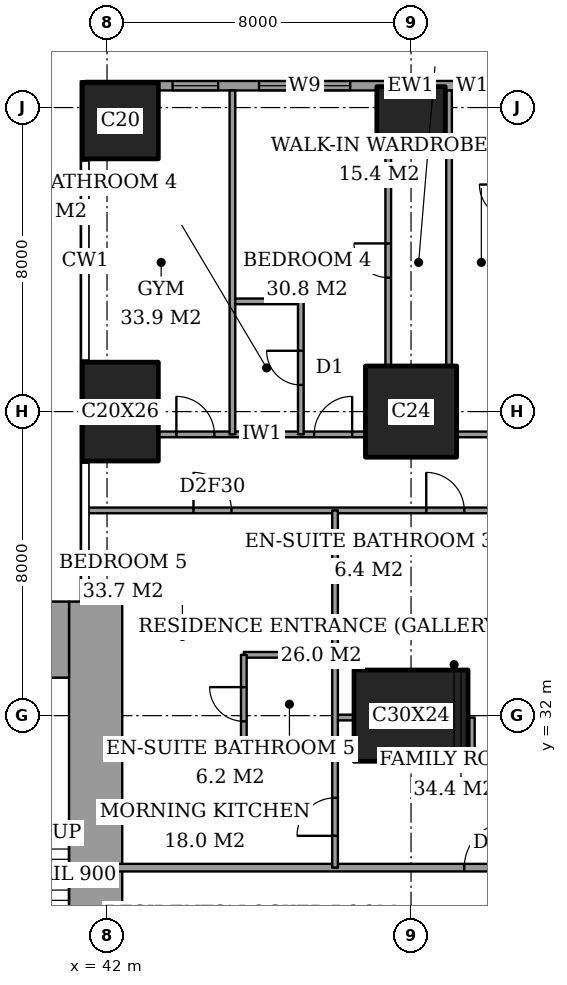
"""IFC4 building model, lengths in metres.
Left out: names, types, materials, properties, quantities, classifications, styles, units other than length and angle.
Written with IfcOpenShell. Run it as: python <this file> out.ifc"""

import sys

from ifc_helpers import new_model, si_unit, direction, frame, frame_2d, origin, origin_2d, place, context, subcontext, project, spatial, rectangle, extrude, element, fill, save


model = new_model("IFC4")
c1 = context("Model", 3, precision=1e-05, world=origin(), true_north=direction((0.0, 1.0)))
c2 = subcontext(c1, "Body", "Model", "MODEL_VIEW")
j1 = project(units=[si_unit("LENGTHUNIT", "METRE"), si_unit("PLANEANGLEUNIT", "RADIAN")], contexts=[c1])
p1 = place(None, origin())
s1 = spatial("IfcSite", under=j1, at=p1, CompositionType="ELEMENT")
p2 = place(p1, origin())
s2 = spatial("IfcBuilding", under=s1, at=p2, CompositionType="ELEMENT")
p3 = place(p2, frame((0.0, 0.0, 196.6)))
s3 = spatial("IfcBuildingStorey", under=s2, at=p3, CompositionType="ELEMENT", Elevation=196.6)
p4 = place(p3, frame((42.35, 40.0, 0.0), z_axis=(0.0, 0.0, 1.0), x_axis=(1.0, 0.0, 0.0)))
e1 = element("IfcColumn", 1, at=p4, inside=s3, PredefinedType="COLUMN", context=c2, shape_type="SweptSolid", body=[
    extrude(rectangle(XDim=2.0, YDim=2.6, at=origin_2d()), origin(), (0.0, 0.0, 1.0), 3.6),
])
p5 = place(p3, frame((42.35, 47.65, 0.0), z_axis=(0.0, 0.0, 1.0), x_axis=(1.0, 0.0, 0.0)))
e2 = element("IfcColumn", 2, at=p5, inside=s3, PredefinedType="COLUMN", context=c2, shape_type="SweptSolid", body=[
    extrude(rectangle(XDim=2.0, YDim=2.0, at=origin_2d()), origin(), (0.0, 0.0, 1.0), 3.6),
])
p6 = place(p3, frame((50.0, 32.0, 0.0), z_axis=(0.0, 0.0, 1.0), x_axis=(1.0, 0.0, 0.0)))
e3 = element("IfcColumn", 3, at=p6, inside=s3, PredefinedType="COLUMN", context=c2, shape_type="SweptSolid", body=[
    extrude(rectangle(XDim=3.0, YDim=2.4, at=origin_2d()), origin(), (0.0, 0.0, 1.0), 3.6),
])
p7 = place(p3, frame((50.0, 40.0, 0.0), z_axis=(0.0, 0.0, 1.0), x_axis=(1.0, 0.0, 0.0)))
e4 = element("IfcColumn", 4, at=p7, inside=s3, PredefinedType="COLUMN", context=c2, shape_type="SweptSolid", body=[
    extrude(rectangle(XDim=2.4, YDim=2.4, at=origin_2d()), origin(), (0.0, 0.0, 1.0), 3.6),
])
p8 = place(p3, frame((50.0, 47.65, 0.0), z_axis=(0.0, 0.0, 1.0), x_axis=(1.0, 0.0, 0.0)))
e5 = element("IfcColumn", 5, at=p8, inside=s3, PredefinedType="COLUMN", context=c2, shape_type="SweptSolid", body=[
    extrude(rectangle(XDim=1.8, YDim=1.8, at=origin_2d()), origin(), (0.0, 0.0, 1.0), 3.6),
])
p9 = place(p3, frame((37.85, 34.0, 0.0), z_axis=(0.0, 0.0, 1.0), x_axis=(1.0, 0.0, 0.0)))
e6 = element("IfcWall", 6, at=p9, inside=s3, PredefinedType="SHEAR", context=c2, shape_type="SweptSolid", body=[
    extrude(rectangle(XDim=3.15, YDim=2.0, at=frame_2d((1.575, 0.0))), origin(), (0.0, 0.0, 1.0), 3.6),
])
p10 = place(p3, frame((41.7, 24.85, 0.0), z_axis=(0.0, 0.0, 1.0), x_axis=(0.0, 1.0, 0.0)))
e7 = element("IfcWall", 7, at=p10, inside=s3, PredefinedType="SHEAR", context=c2, shape_type="SweptSolid", body=[
    extrude(rectangle(XDim=10.15, YDim=1.4, at=frame_2d((5.075, 0.0))), origin(), (0.0, 0.0, 1.0), 3.6),
])
p11 = place(p3, frame((62.825, 48.575, 0.0), z_axis=(0.0, 0.0, 1.0), x_axis=(-1.0, 0.0, 0.0)))
e8 = element("IfcWall", 8, at=p11, inside=s3, PredefinedType="SOLIDWALL", context=c2, shape_type="SweptSolid", body=[
    extrude(rectangle(XDim=21.4, YDim=0.25, at=frame_2d((10.7, 0.0))), origin(), (0.0, 0.0, 1.0), 3.6),
])
p12 = place(p11, frame((0.5, 0.0, 0.2)))
e9 = element("IfcOpeningElement", 9, at=p12, cuts=e8, PredefinedType="OPENING", context=c2, shape_type="SweptSolid", body=[
    extrude(rectangle(XDim=1.2, YDim=2.4, at=frame_2d((0.6, 1.2))), frame((0.0, 0.135, 0.0), z_axis=(0.0, -1.0, 0.0), x_axis=(1.0, 0.0, 0.0)), (0.0, 0.0, 1.0), 0.27),
])
p13 = place(p11, frame((2.4, 0.0, 0.2)))
e10 = element("IfcOpeningElement", 10, at=p13, cuts=e8, PredefinedType="OPENING", context=c2, shape_type="SweptSolid", body=[
    extrude(rectangle(XDim=1.2, YDim=2.4, at=frame_2d((0.6, 1.2))), frame((0.0, 0.135, 0.0), z_axis=(0.0, -1.0, 0.0), x_axis=(1.0, 0.0, 0.0)), (0.0, 0.0, 1.0), 0.27),
])
p14 = place(p11, frame((6.775, 0.0, 0.2)))
e11 = element("IfcOpeningElement", 11, at=p14, cuts=e8, PredefinedType="OPENING", context=c2, shape_type="SweptSolid", body=[
    extrude(rectangle(XDim=2.4, YDim=2.4, at=frame_2d((1.2, 1.2))), frame((0.0, 0.135, 0.0), z_axis=(0.0, -1.0, 0.0), x_axis=(1.0, 0.0, 0.0)), (0.0, 0.0, 1.0), 0.27),
])
p15 = place(p11, frame((10.45, 0.0, 0.2)))
e12 = element("IfcOpeningElement", 12, at=p15, cuts=e8, PredefinedType="OPENING", context=c2, shape_type="SweptSolid", body=[
    extrude(rectangle(XDim=1.2, YDim=2.4, at=frame_2d((0.6, 1.2))), frame((0.0, 0.135, 0.0), z_axis=(0.0, -1.0, 0.0), x_axis=(1.0, 0.0, 0.0)), (0.0, 0.0, 1.0), 0.27),
])
p16 = place(p11, frame((14.425, 0.0, 0.2)))
e13 = element("IfcOpeningElement", 13, at=p16, cuts=e8, PredefinedType="OPENING", context=c2, shape_type="SweptSolid", body=[
    extrude(rectangle(XDim=2.4, YDim=2.4, at=frame_2d((1.2, 1.2))), frame((0.0, 0.135, 0.0), z_axis=(0.0, -1.0, 0.0), x_axis=(1.0, 0.0, 0.0)), (0.0, 0.0, 1.0), 0.27),
])
p17 = place(p11, frame((17.9, 0.0, 0.2)))
e14 = element("IfcOpeningElement", 14, at=p17, cuts=e8, PredefinedType="OPENING", context=c2, shape_type="SweptSolid", body=[
    extrude(rectangle(XDim=1.2, YDim=2.4, at=frame_2d((0.6, 1.2))), frame((0.0, 0.135, 0.0), z_axis=(0.0, -1.0, 0.0), x_axis=(1.0, 0.0, 0.0)), (0.0, 0.0, 1.0), 0.27),
])
p18 = place(p3, frame((42.0, 28.0, 0.0), z_axis=(0.0, 0.0, 1.0), x_axis=(1.0, 0.0, 0.0)))
e15 = element("IfcWall", 15, at=p18, inside=s3, PredefinedType="PARTITIONING", context=c2, shape_type="SweptSolid", body=[
    extrude(rectangle(XDim=17.275, YDim=0.2, at=frame_2d((8.637, 0.0))), origin(), (0.0, 0.0, 1.0), 3.35),
])
p19 = place(p18, frame((9.4, 0.0, 0.0)))
e16 = element("IfcOpeningElement", 16, at=p19, cuts=e15, PredefinedType="OPENING", context=c2, shape_type="SweptSolid", body=[
    extrude(rectangle(XDim=1.2, YDim=2.4, at=frame_2d((0.6, 1.2))), frame((0.0, 0.11, 0.0), z_axis=(0.0, -1.0, 0.0), x_axis=(1.0, 0.0, 0.0)), (0.0, 0.0, 1.0), 0.22),
])
p20 = place(p3, frame((51.6, 30.675, 0.0), z_axis=(0.0, 0.0, 1.0), x_axis=(1.0, 0.0, 0.0)))
e17 = element("IfcWall", 17, at=p20, inside=s3, PredefinedType="PARTITIONING", context=c2, shape_type="SweptSolid", body=[
    extrude(rectangle(XDim=4.4, YDim=0.15, at=frame_2d((2.2, 0.0))), origin(), (0.0, 0.0, 1.0), 3.35),
])
p21 = place(p20, frame((2.8, 0.0, 0.0)))
e18 = element("IfcOpeningElement", 18, at=p21, cuts=e17, PredefinedType="OPENING", context=c2, shape_type="SweptSolid", body=[
    extrude(rectangle(XDim=1.0, YDim=2.1, at=frame_2d((0.5, 1.05))), frame((0.0, 0.085, 0.0), z_axis=(0.0, -1.0, 0.0), x_axis=(1.0, 0.0, 0.0)), (0.0, 0.0, 1.0), 0.17),
])
p22 = place(p3, frame((42.0, 31.0, 0.0), z_axis=(0.0, 0.0, 1.0), x_axis=(1.0, 0.0, 0.0)))
e19 = element("IfcWall", 19, at=p22, inside=s3, PredefinedType="PARTITIONING", context=c2, shape_type="SweptSolid", body=[
    extrude(rectangle(XDim=6.0, YDim=0.15, at=frame_2d((3.0, 0.0))), origin(), (0.0, 0.0, 1.0), 3.35),
])
p23 = place(p3, frame((48.0, 31.95, 0.0), z_axis=(0.0, 0.0, 1.0), x_axis=(1.0, 0.0, 0.0)))
e20 = element("IfcWall", 20, at=p23, inside=s3, PredefinedType="PARTITIONING", context=c2, shape_type="SweptSolid", body=[
    extrude(rectangle(XDim=0.5, YDim=0.15, at=frame_2d((0.25, 0.0))), origin(), (0.0, 0.0, 1.0), 3.35),
])
p24 = place(p3, frame((45.6, 33.6, 0.0), z_axis=(0.0, 0.0, 1.0), x_axis=(1.0, 0.0, 0.0)))
e21 = element("IfcWall", 21, at=p24, inside=s3, PredefinedType="PARTITIONING", context=c2, shape_type="SweptSolid", body=[
    extrude(rectangle(XDim=2.4, YDim=0.15, at=frame_2d((1.2, 0.0))), origin(), (0.0, 0.0, 1.0), 3.35),
])
p25 = place(p3, frame((41.439, 37.4, 0.0), z_axis=(0.0, 0.0, 1.0), x_axis=(1.0, 0.0, 0.0)))
e22 = element("IfcWall", 22, at=p25, inside=s3, PredefinedType="PARTITIONING", context=c2, shape_type="SweptSolid", body=[
    extrude(rectangle(XDim=25.011, YDim=0.15, at=frame_2d((12.505, 0.0))), origin(), (0.0, 0.0, 1.0), 3.35),
])
p26 = place(p25, frame((12.961, 0.0, 0.0)))
e23 = element("IfcOpeningElement", 23, at=p26, cuts=e22, PredefinedType="OPENING", context=c2, shape_type="SweptSolid", body=[
    extrude(rectangle(XDim=1.0, YDim=2.1, at=frame_2d((0.5, 1.05))), frame((0.0, 0.085, 0.0), z_axis=(0.0, -1.0, 0.0), x_axis=(1.0, 0.0, 0.0)), (0.0, 0.0, 1.0), 0.17),
])
p27 = place(p25, frame((20.924, 0.0, 0.0)))
e24 = element("IfcOpeningElement", 24, at=p27, cuts=e22, PredefinedType="OPENING", context=c2, shape_type="SweptSolid", body=[
    extrude(rectangle(XDim=1.0, YDim=2.1, at=frame_2d((0.5, 1.05))), frame((0.0, 0.085, 0.0), z_axis=(0.0, -1.0, 0.0), x_axis=(1.0, 0.0, 0.0)), (0.0, 0.0, 1.0), 0.17),
])
p28 = place(p25, frame((15.749, 0.0, 0.0)))
e25 = element("IfcOpeningElement", 25, at=p28, cuts=e22, PredefinedType="OPENING", context=c2, shape_type="SweptSolid", body=[
    extrude(rectangle(XDim=0.9, YDim=2.1, at=frame_2d((0.45, 1.05))), frame((0.0, 0.085, 0.0), z_axis=(0.0, -1.0, 0.0), x_axis=(1.0, 0.0, 0.0)), (0.0, 0.0, 1.0), 0.17),
])
p29 = place(p25, frame((8.961, 0.0, 0.0)))
e26 = element("IfcOpeningElement", 26, at=p29, cuts=e22, PredefinedType="OPENING", context=c2, shape_type="SweptSolid", body=[
    extrude(rectangle(XDim=1.0, YDim=2.1, at=frame_2d((0.5, 1.05))), frame((0.0, 0.085, 0.0), z_axis=(0.0, -1.0, 0.0), x_axis=(1.0, 0.0, 0.0)), (0.0, 0.0, 1.0), 0.17),
])
p30 = place(p25, frame((2.836, 0.0, 0.0)))
e27 = element("IfcOpeningElement", 27, at=p30, cuts=e22, PredefinedType="OPENING", context=c2, shape_type="SweptSolid", body=[
    extrude(rectangle(XDim=1.0, YDim=2.1, at=frame_2d((0.5, 1.05))), frame((0.0, 0.085, 0.0), z_axis=(0.0, -1.0, 0.0), x_axis=(1.0, 0.0, 0.0)), (0.0, 0.0, 1.0), 0.17),
])
p31 = place(p3, frame((43.35, 39.4, 0.0), z_axis=(0.0, 0.0, 1.0), x_axis=(1.0, 0.0, 0.0)))
e28 = element("IfcWall", 28, at=p31, inside=s3, PredefinedType="PARTITIONING", context=c2, shape_type="SweptSolid", body=[
    extrude(rectangle(XDim=5.45, YDim=0.15, at=frame_2d((2.725, 0.0))), origin(), (0.0, 0.0, 1.0), 3.35),
])
p32 = place(p31, frame((4.1, 0.0, 0.0)))
e29 = element("IfcOpeningElement", 29, at=p32, cuts=e28, PredefinedType="OPENING", context=c2, shape_type="SweptSolid", body=[
    extrude(rectangle(XDim=1.0, YDim=2.1, at=frame_2d((0.5, 1.05))), frame((0.0, 0.085, 0.0), z_axis=(0.0, -1.0, 0.0), x_axis=(1.0, 0.0, 0.0)), (0.0, 0.0, 1.0), 0.17),
])
p33 = place(p31, frame((0.475, 0.0, 0.0)))
e30 = element("IfcOpeningElement", 30, at=p33, cuts=e28, PredefinedType="OPENING", context=c2, shape_type="SweptSolid", body=[
    extrude(rectangle(XDim=1.0, YDim=2.1, at=frame_2d((0.5, 1.05))), frame((0.0, 0.085, 0.0), z_axis=(0.0, -1.0, 0.0), x_axis=(1.0, 0.0, 0.0)), (0.0, 0.0, 1.0), 0.17),
])
p34 = place(p3, frame((51.2, 39.4, 0.0), z_axis=(0.0, 0.0, 1.0), x_axis=(1.0, 0.0, 0.0)))
e31 = element("IfcWall", 31, at=p34, inside=s3, PredefinedType="PARTITIONING", context=c2, shape_type="SweptSolid", body=[
    extrude(rectangle(XDim=5.9, YDim=0.15, at=frame_2d((2.95, 0.0))), origin(), (0.0, 0.0, 1.0), 3.35),
])
p35 = place(p34, frame((4.15, 0.0, 0.0)))
e32 = element("IfcOpeningElement", 32, at=p35, cuts=e31, PredefinedType="OPENING", context=c2, shape_type="SweptSolid", body=[
    extrude(rectangle(XDim=1.0, YDim=2.1, at=frame_2d((0.5, 1.05))), frame((0.0, 0.085, 0.0), z_axis=(0.0, -1.0, 0.0), x_axis=(1.0, 0.0, 0.0)), (0.0, 0.0, 1.0), 0.17),
])
p36 = place(p3, frame((45.3, 42.9, 0.0), z_axis=(0.0, 0.0, 1.0), x_axis=(1.0, 0.0, 0.0)))
e33 = element("IfcWall", 33, at=p36, inside=s3, PredefinedType="PARTITIONING", context=c2, shape_type="SweptSolid", body=[
    extrude(rectangle(XDim=1.8, YDim=0.15, at=frame_2d((0.9, 0.0))), origin(), (0.0, 0.0, 1.0), 3.35),
])
p37 = place(p3, frame((45.3, 39.4, 0.0), z_axis=(0.0, 0.0, 1.0), x_axis=(0.0, 1.0, 0.0)))
e34 = element("IfcWall", 34, at=p37, inside=s3, PredefinedType="PARTITIONING", context=c2, shape_type="SweptSolid", body=[
    extrude(rectangle(XDim=9.05, YDim=0.15, at=frame_2d((4.525, 0.0))), origin(), (0.0, 0.0, 1.0), 3.35),
])
p38 = place(p3, frame((45.6, 31.0, 0.0), z_axis=(0.0, 0.0, 1.0), x_axis=(0.0, 1.0, 0.0)))
e35 = element("IfcWall", 35, at=p38, inside=s3, PredefinedType="PARTITIONING", context=c2, shape_type="SweptSolid", body=[
    extrude(rectangle(XDim=2.6, YDim=0.15, at=frame_2d((1.3, 0.0))), origin(), (0.0, 0.0, 1.0), 3.35),
])
p39 = place(p38, frame((0.85, 0.0, 0.0)))
e36 = element("IfcOpeningElement", 36, at=p39, cuts=e35, PredefinedType="OPENING", context=c2, shape_type="SweptSolid", body=[
    extrude(rectangle(XDim=0.9, YDim=2.1, at=frame_2d((0.45, 1.05))), frame((0.0, 0.085, 0.0), z_axis=(0.0, -1.0, 0.0), x_axis=(1.0, 0.0, 0.0)), (0.0, 0.0, 1.0), 0.17),
])
p40 = place(p3, frame((47.1, 39.4, 0.0), z_axis=(0.0, 0.0, 1.0), x_axis=(0.0, 1.0, 0.0)))
e37 = element("IfcWall", 37, at=p40, inside=s3, PredefinedType="PARTITIONING", context=c2, shape_type="SweptSolid", body=[
    extrude(rectangle(XDim=3.5, YDim=0.15, at=frame_2d((1.75, 0.0))), origin(), (0.0, 0.0, 1.0), 3.35),
])
p41 = place(p40, frame((1.3, 0.0, 0.0)))
e38 = element("IfcOpeningElement", 38, at=p41, cuts=e37, PredefinedType="OPENING", context=c2, shape_type="SweptSolid", body=[
    extrude(rectangle(XDim=0.9, YDim=2.1, at=frame_2d((0.45, 1.05))), frame((0.0, 0.085, 0.0), z_axis=(0.0, -1.0, 0.0), x_axis=(1.0, 0.0, 0.0)), (0.0, 0.0, 1.0), 0.17),
])
p42 = place(p3, frame((48.0, 28.0, 0.0), z_axis=(0.0, 0.0, 1.0), x_axis=(0.0, 1.0, 0.0)))
e39 = element("IfcWall", 39, at=p42, inside=s3, PredefinedType="PARTITIONING", context=c2, shape_type="SweptSolid", body=[
    extrude(rectangle(XDim=9.4, YDim=0.15, at=frame_2d((4.7, 0.0))), origin(), (0.0, 0.0, 1.0), 3.35),
])
p43 = place(p42, frame((0.837, 0.0, 0.0)))
e40 = element("IfcOpeningElement", 40, at=p43, cuts=e39, PredefinedType="OPENING", context=c2, shape_type="SweptSolid", body=[
    extrude(rectangle(XDim=1.0, YDim=2.1, at=frame_2d((0.5, 1.05))), frame((0.0, 0.085, 0.0), z_axis=(0.0, -1.0, 0.0), x_axis=(1.0, 0.0, 0.0)), (0.0, 0.0, 1.0), 0.17),
])
p44 = place(p3, frame((49.4, 41.2, 0.0), z_axis=(0.0, 0.0, 1.0), x_axis=(0.0, 1.0, 0.0)))
e41 = element("IfcWall", 41, at=p44, inside=s3, PredefinedType="PARTITIONING", context=c2, shape_type="SweptSolid", body=[
    extrude(rectangle(XDim=5.55, YDim=0.15, at=frame_2d((2.775, 0.0))), origin(), (0.0, 0.0, 1.0), 3.35),
])
p45 = place(p44, frame((2.325, 0.0, 0.0)))
e42 = element("IfcOpeningElement", 42, at=p45, cuts=e41, PredefinedType="OPENING", context=c2, shape_type="SweptSolid", body=[
    extrude(rectangle(XDim=0.9, YDim=2.1, at=frame_2d((0.45, 1.05))), frame((0.0, 0.085, 0.0), z_axis=(0.0, -1.0, 0.0), x_axis=(1.0, 0.0, 0.0)), (0.0, 0.0, 1.0), 0.17),
])
p46 = place(p3, frame((51.0, 41.2, 0.0), z_axis=(0.0, 0.0, 1.0), x_axis=(0.0, 1.0, 0.0)))
e43 = element("IfcWall", 43, at=p46, inside=s3, PredefinedType="PARTITIONING", context=c2, shape_type="SweptSolid", body=[
    extrude(rectangle(XDim=7.25, YDim=0.15, at=frame_2d((3.625, 0.0))), origin(), (0.0, 0.0, 1.0), 3.35),
])
p47 = place(p3, frame((51.6, 30.675, 0.0), z_axis=(0.0, 0.0, 1.0), x_axis=(0.0, 1.0, 0.0)))
e44 = element("IfcWall", 44, at=p47, inside=s3, PredefinedType="PARTITIONING", context=c2, shape_type="SweptSolid", body=[
    extrude(rectangle(XDim=1.275, YDim=0.15, at=frame_2d((0.637, 0.0))), origin(), (0.0, 0.0, 1.0), 3.35),
])
p48 = place(p15, origin())
e45 = element("IfcWindow", 45, at=p48, inside=s3, PartitioningType="SINGLE_PANEL", PredefinedType="WINDOW", context=c2, shape_type="SweptSolid", body=[
    extrude(rectangle(XDim=1.2, YDim=2.4, at=frame_2d((0.6, 1.2))), frame((0.0, 0.03, 0.0), z_axis=(0.0, -1.0, 0.0), x_axis=(1.0, 0.0, 0.0)), (0.0, 0.0, 1.0), 0.06),
])
fill(e12, e45)
p49 = place(p16, origin())
e46 = element("IfcWindow", 46, at=p49, inside=s3, PartitioningType="SINGLE_PANEL", PredefinedType="WINDOW", context=c2, shape_type="SweptSolid", body=[
    extrude(rectangle(XDim=2.4, YDim=2.4, at=frame_2d((1.2, 1.2))), frame((0.0, 0.03, 0.0), z_axis=(0.0, -1.0, 0.0), x_axis=(1.0, 0.0, 0.0)), (0.0, 0.0, 1.0), 0.06),
])
fill(e13, e46)
p50 = place(p17, origin())
e47 = element("IfcWindow", 47, at=p50, inside=s3, PartitioningType="SINGLE_PANEL", PredefinedType="WINDOW", context=c2, shape_type="SweptSolid", body=[
    extrude(rectangle(XDim=1.2, YDim=2.4, at=frame_2d((0.6, 1.2))), frame((0.0, 0.03, 0.0), z_axis=(0.0, -1.0, 0.0), x_axis=(1.0, 0.0, 0.0)), (0.0, 0.0, 1.0), 0.06),
])
fill(e14, e47)
p51 = place(p45, origin())
e48 = element("IfcDoor", 48, at=p51, inside=s3, OperationType="SINGLE_SWING_LEFT", PredefinedType="DOOR", context=c2, shape_type="SweptSolid", body=[
    extrude(rectangle(XDim=0.9, YDim=2.1, at=frame_2d((0.45, 1.05))), frame((0.0, 0.025, 0.0), z_axis=(0.0, -1.0, 0.0), x_axis=(1.0, 0.0, 0.0)), (0.0, 0.0, 1.0), 0.05),
])
fill(e42, e48)
p52 = place(p41, origin())
e49 = element("IfcDoor", 49, at=p52, inside=s3, OperationType="SINGLE_SWING_LEFT", PredefinedType="DOOR", context=c2, shape_type="SweptSolid", body=[
    extrude(rectangle(XDim=0.9, YDim=2.1, at=frame_2d((0.45, 1.05))), frame((0.0, 0.025, 0.0), z_axis=(0.0, -1.0, 0.0), x_axis=(1.0, 0.0, 0.0)), (0.0, 0.0, 1.0), 0.05),
])
fill(e38, e49)
p53 = place(p32, origin())
e50 = element("IfcDoor", 50, at=p53, inside=s3, OperationType="SINGLE_SWING_LEFT", PredefinedType="DOOR", context=c2, shape_type="SweptSolid", body=[
    extrude(rectangle(XDim=1.0, YDim=2.1, at=frame_2d((0.5, 1.05))), frame((0.0, 0.025, 0.0), z_axis=(0.0, -1.0, 0.0), x_axis=(1.0, 0.0, 0.0)), (0.0, 0.0, 1.0), 0.05),
])
fill(e29, e50)
p54 = place(p33, origin())
e51 = element("IfcDoor", 51, at=p54, inside=s3, OperationType="SINGLE_SWING_RIGHT", PredefinedType="DOOR", context=c2, shape_type="SweptSolid", body=[
    extrude(rectangle(XDim=1.0, YDim=2.1, at=frame_2d((0.5, 1.05))), frame((0.0, 0.025, 0.0), z_axis=(0.0, -1.0, 0.0), x_axis=(1.0, 0.0, 0.0)), (0.0, 0.0, 1.0), 0.05),
])
fill(e30, e51)
p55 = place(p19, origin())
e52 = element("IfcDoor", 52, at=p55, inside=s3, OperationType="SINGLE_SWING_LEFT", PredefinedType="DOOR", context=c2, shape_type="SweptSolid", body=[
    extrude(rectangle(XDim=1.2, YDim=2.4, at=frame_2d((0.6, 1.2))), frame((0.0, 0.025, 0.0), z_axis=(0.0, -1.0, 0.0), x_axis=(1.0, 0.0, 0.0)), (0.0, 0.0, 1.0), 0.05),
])
fill(e16, e52)
p56 = place(p29, origin())
e53 = element("IfcDoor", 53, at=p56, inside=s3, OperationType="SINGLE_SWING_RIGHT", PredefinedType="DOOR", context=c2, shape_type="SweptSolid", body=[
    extrude(rectangle(XDim=1.0, YDim=2.1, at=frame_2d((0.5, 1.05))), frame((0.0, 0.025, 0.0), z_axis=(0.0, -1.0, 0.0), x_axis=(1.0, 0.0, 0.0)), (0.0, 0.0, 1.0), 0.05),
])
fill(e26, e53)
p57 = place(p39, origin())
e54 = element("IfcDoor", 54, at=p57, inside=s3, OperationType="SINGLE_SWING_LEFT", PredefinedType="DOOR", context=c2, shape_type="SweptSolid", body=[
    extrude(rectangle(XDim=0.9, YDim=2.1, at=frame_2d((0.45, 1.05))), frame((0.0, 0.025, 0.0), z_axis=(0.0, -1.0, 0.0), x_axis=(1.0, 0.0, 0.0)), (0.0, 0.0, 1.0), 0.05),
])
fill(e36, e54)
p58 = place(p30, origin())
e55 = element("IfcDoor", 55, at=p58, inside=s3, OperationType="SINGLE_SWING_RIGHT", PredefinedType="DOOR", context=c2, shape_type="SweptSolid", body=[
    extrude(rectangle(XDim=1.0, YDim=2.1, at=frame_2d((0.5, 1.05))), frame((0.0, 0.025, 0.0), z_axis=(0.0, -1.0, 0.0), x_axis=(1.0, 0.0, 0.0)), (0.0, 0.0, 1.0), 0.05),
])
fill(e27, e55)
p59 = place(p43, origin())
e56 = element("IfcDoor", 56, at=p59, inside=s3, OperationType="SINGLE_SWING_RIGHT", PredefinedType="DOOR", context=c2, shape_type="SweptSolid", body=[
    extrude(rectangle(XDim=1.0, YDim=2.1, at=frame_2d((0.5, 1.05))), frame((0.0, 0.025, 0.0), z_axis=(0.0, -1.0, 0.0), x_axis=(1.0, 0.0, 0.0)), (0.0, 0.0, 1.0), 0.05),
])
fill(e40, e56)
save(model, sys.argv[1])
